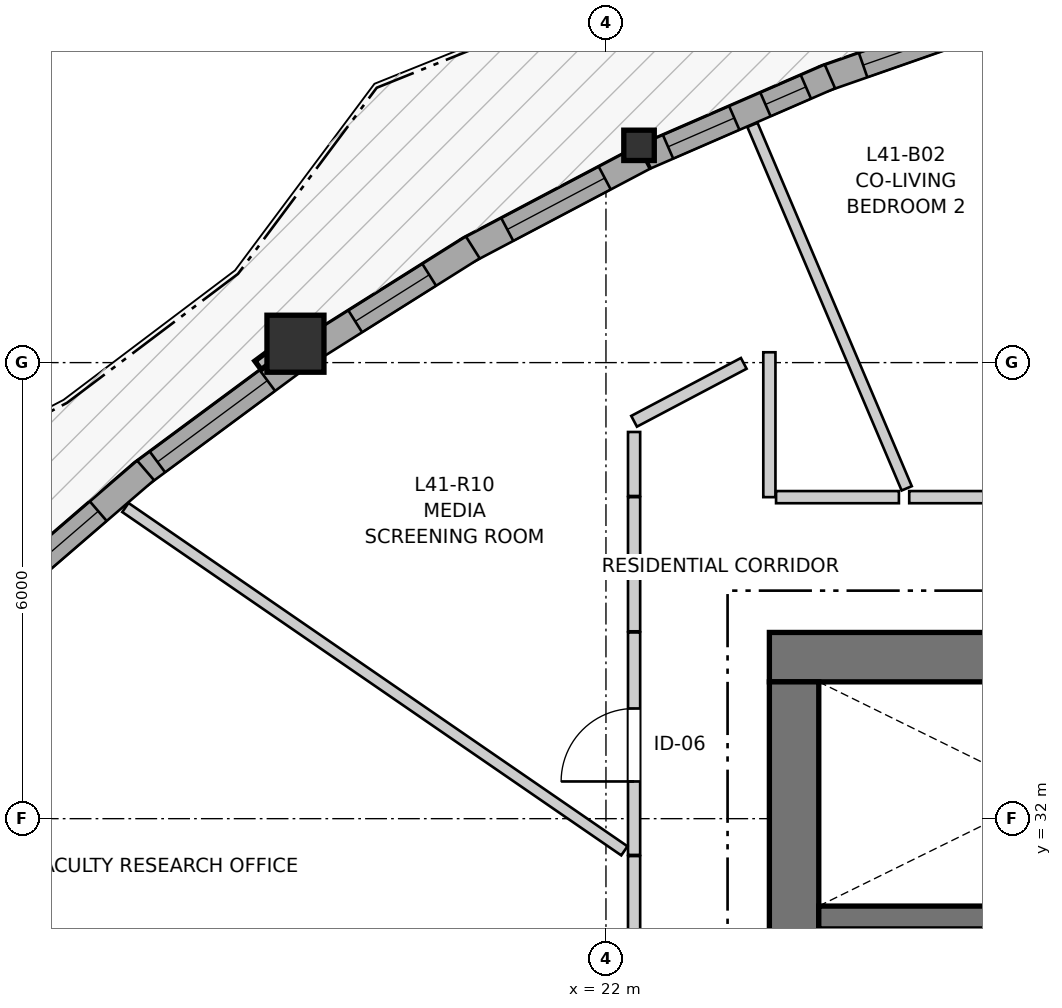
"""IFC4 building model, lengths in metres.
Left out: names, types, materials, properties, quantities, classifications, styles, units other than length and angle.
Written with IfcOpenShell. Run it as: python <this file> out.ifc"""

import sys

from ifc_helpers import new_model, si_unit, direction, frame, frame_2d, origin, origin_2d, place, context, subcontext, project, spatial, rectangle, i_section, extrude, source, transform, mapped, element, fill, save


model = new_model("IFC4")
c1 = context("Model", 3, precision=1e-05, world=origin(), true_north=direction((0.0, 1.0)))
c2 = subcontext(c1, "Body", "Model", "MODEL_VIEW")
j1 = project(units=[si_unit("LENGTHUNIT", "METRE"), si_unit("PLANEANGLEUNIT", "RADIAN")], contexts=[c1])
p1 = place(None, origin())
s1 = spatial("IfcSite", under=j1, at=p1, CompositionType="ELEMENT")
p2 = place(p1, origin())
s2 = spatial("IfcBuilding", under=s1, at=p2, CompositionType="ELEMENT")
p3 = place(p2, frame((0.0, 0.0, 139.4)))
s3 = spatial("IfcBuildingStorey", under=s2, at=p3, CompositionType="ELEMENT", Elevation=139.4)
p4 = place(p3, frame((36.55, 34.125, 0.0), z_axis=(0.0, 0.0, 1.0), x_axis=(-1.0, 0.0, 0.0)))
e1 = element("IfcWall", 1, at=p4, inside=s3, PredefinedType="SHEAR", context=c2, shape_type="SweptSolid", body=[
    extrude(rectangle(XDim=12.4, YDim=0.65, at=frame_2d((6.2, 0.0))), origin(), (0.0, 0.0, 1.0), 2.95),
])
p5 = place(p3, frame((24.475, 33.8, 0.0), z_axis=(0.0, 0.0, 1.0), x_axis=(0.0, -1.0, 0.0)))
e2 = element("IfcWall", 2, at=p5, inside=s3, PredefinedType="SHEAR", context=c2, shape_type="SweptSolid", body=[
    extrude(rectangle(XDim=15.6, YDim=0.65, at=frame_2d((7.8, 0.0))), origin(), (0.0, 0.0, 1.0), 2.95),
])
p6 = place(p5, frame((7.05, 0.0, 0.0)))
e3 = element("IfcOpeningElement", 3, at=p6, cuts=e2, PredefinedType="OPENING", context=c2, shape_type="SweptSolid", body=[
    extrude(rectangle(XDim=1.5, YDim=2.15, at=frame_2d((0.75, 1.075))), frame((0.0, 0.335, 0.0), z_axis=(0.0, -1.0, 0.0), x_axis=(1.0, 0.0, 0.0)), (0.0, 0.0, 1.0), 0.67),
])
p7 = place(p5, frame((3.52, 0.0, 0.0)))
e4 = element("IfcOpeningElement", 4, at=p7, cuts=e2, PredefinedType="OPENING", context=c2, shape_type="SweptSolid", body=[
    extrude(rectangle(XDim=0.86, YDim=2.05, at=frame_2d((0.43, 1.025))), frame((0.0, 0.335, 0.0), z_axis=(0.0, -1.0, 0.0), x_axis=(1.0, 0.0, 0.0)), (0.0, 0.0, 1.0), 0.67),
])
p8 = place(p5, frame((11.22, 0.0, 0.0)))
e5 = element("IfcOpeningElement", 5, at=p8, cuts=e2, PredefinedType="OPENING", context=c2, shape_type="SweptSolid", body=[
    extrude(rectangle(XDim=0.86, YDim=2.05, at=frame_2d((0.43, 1.025))), frame((0.0, 0.335, 0.0), z_axis=(0.0, -1.0, 0.0), x_axis=(1.0, 0.0, 0.0)), (0.0, 0.0, 1.0), 0.67),
])
p9 = place(p3, frame((24.8, 30.7, 0.0), z_axis=(0.0, 0.0, 1.0), x_axis=(1.0, 0.0, 0.0)))
e6 = element("IfcWall", 6, at=p9, inside=s3, PredefinedType="SHEAR", context=c2, shape_type="SweptSolid", body=[
    extrude(rectangle(XDim=11.1, YDim=0.3, at=frame_2d((5.55, 0.0))), origin(), (0.0, 0.0, 1.0), 2.95),
])
p10 = place(p9, frame((6.22, 0.0, 0.0)))
e7 = element("IfcOpeningElement", 7, at=p10, cuts=e6, PredefinedType="OPENING", context=c2, shape_type="SweptSolid", body=[
    extrude(rectangle(XDim=0.98, YDim=2.15, at=frame_2d((0.49, 1.075))), frame((0.0, 0.16, 0.0), z_axis=(0.0, -1.0, 0.0), x_axis=(1.0, 0.0, 0.0)), (0.0, 0.0, 1.0), 0.32),
])
p11 = place(p9, frame((9.15, 0.0, 0.0)))
e8 = element("IfcOpeningElement", 8, at=p11, cuts=e6, PredefinedType="OPENING", context=c2, shape_type="SweptSolid", body=[
    extrude(rectangle(XDim=1.15, YDim=2.15, at=frame_2d((0.575, 1.075))), frame((0.0, 0.16, 0.0), z_axis=(0.0, -1.0, 0.0), x_axis=(1.0, 0.0, 0.0)), (0.0, 0.0, 1.0), 0.32),
])
m1 = source(origin(), c2, "Body", "SweptSolid", [
    extrude(i_section(OverallWidth=0.401, OverallDepth=0.399, WebThickness=0.023, FlangeThickness=0.036, FilletRadius=0.015, at=origin_2d()), origin(), (0.0, 0.0, 1.0), 2.95),
])
p12 = place(p3, frame((22.435, 40.858, 0.0), z_axis=(0.0, 0.0, 1.0), x_axis=(1.0, 0.0, 0.0)))
e9 = element("IfcColumn", 9, at=p12, inside=s3, PredefinedType="PILASTER", context=c2, shape_type="MappedRepresentation", body=[
    mapped(m1, transform((0.0, 0.0, 0.0), x_axis=(1.0, 0.0, 0.0), y_axis=(0.0, 1.0, 0.0), z_axis=(0.0, 0.0, 1.0), scale=1.0)),
])
m2 = source(origin(), c2, "Body", "SweptSolid", [
    extrude(rectangle(XDim=0.75, YDim=0.75, at=origin_2d()), origin(), (0.0, 0.0, 1.0), 2.95),
])
p13 = place(p3, frame((17.915, 38.249, 0.0), z_axis=(0.0, 0.0, 1.0), x_axis=(1.0, 0.0, 0.0)))
e10 = element("IfcColumn", 10, at=p13, inside=s3, PredefinedType="COLUMN", context=c2, shape_type="MappedRepresentation", body=[
    mapped(m2, transform((0.0, 0.0, 0.0), x_axis=(1.0, 0.0, 0.0), y_axis=(0.0, 1.0, 0.0), z_axis=(0.0, 0.0, 1.0), scale=1.0)),
])
p14 = place(p3, frame((27.262, 42.57, 0.0), z_axis=(0.0, 0.0, 1.0), x_axis=(-0.944148723561, -0.329519631884, 0.0)))
e11 = element("IfcWall", 11, at=p14, inside=s3, PredefinedType="SOLIDWALL", context=c2, shape_type="SweptSolid", body=[
    extrude(rectangle(XDim=2.54, YDim=0.34, at=frame_2d((1.27, 0.0))), origin(), (0.0, 0.0, 1.0), 2.53),
])
p15 = place(p14, frame((0.54, 0.0, 0.82)))
e12 = element("IfcOpeningElement", 12, at=p15, cuts=e11, PredefinedType="OPENING", context=c2, shape_type="SweptSolid", body=[
    extrude(rectangle(XDim=1.45, YDim=1.25, at=frame_2d((0.725, 0.625))), frame((0.0, 0.18, 0.0), z_axis=(0.0, -1.0, 0.0), x_axis=(1.0, 0.0, 0.0)), (0.0, 0.0, 1.0), 0.36),
])
p16 = place(p3, frame((24.947, 41.765, 0.0), z_axis=(0.0, 0.0, 1.0), x_axis=(-0.917074459221, -0.398715984435, 0.0)))
e13 = element("IfcWall", 13, at=p16, inside=s3, PredefinedType="SOLIDWALL", context=c2, shape_type="SweptSolid", body=[
    extrude(rectangle(XDim=2.645, YDim=0.34, at=frame_2d((1.322, 0.0))), origin(), (0.0, 0.0, 1.0), 2.53),
])
p17 = place(p16, frame((0.344, 0.0, 0.82)))
e14 = element("IfcOpeningElement", 14, at=p17, cuts=e13, PredefinedType="OPENING", context=c2, shape_type="SweptSolid", body=[
    extrude(rectangle(XDim=0.58, YDim=1.35, at=frame_2d((0.29, 0.675))), frame((0.0, 0.18, 0.0), z_axis=(0.0, -1.0, 0.0), x_axis=(1.0, 0.0, 0.0)), (0.0, 0.0, 1.0), 0.36),
])
p18 = place(p16, frame((1.372, 0.0, 0.82)))
e15 = element("IfcOpeningElement", 15, at=p18, cuts=e13, PredefinedType="OPENING", context=c2, shape_type="SweptSolid", body=[
    extrude(rectangle(XDim=0.95, YDim=1.35, at=frame_2d((0.475, 0.675))), frame((0.0, 0.18, 0.0), z_axis=(0.0, -1.0, 0.0), x_axis=(1.0, 0.0, 0.0)), (0.0, 0.0, 1.0), 0.36),
])
p19 = place(p3, frame((22.497, 40.699, 0.0), z_axis=(0.0, 0.0, 1.0), x_axis=(-0.88439007496, -0.466748535415, 0.0)))
e16 = element("IfcWall", 16, at=p19, inside=s3, PredefinedType="SOLIDWALL", context=c2, shape_type="SweptSolid", body=[
    extrude(rectangle(XDim=2.63, YDim=0.34, at=frame_2d((1.315, 0.0))), origin(), (0.0, 0.0, 1.0), 2.53),
])
p20 = place(p19, frame((0.58, 0.0, 0.82)))
e17 = element("IfcOpeningElement", 17, at=p20, cuts=e16, PredefinedType="OPENING", context=c2, shape_type="SweptSolid", body=[
    extrude(rectangle(XDim=1.45, YDim=1.25, at=frame_2d((0.725, 0.625))), frame((0.0, 0.18, 0.0), z_axis=(0.0, -1.0, 0.0), x_axis=(1.0, 0.0, 0.0)), (0.0, 0.0, 1.0), 0.36),
])
p21 = place(p3, frame((20.248, 39.516, 0.0), z_axis=(0.0, 0.0, 1.0), x_axis=(-0.846438698205, -0.532486178394, 0.0)))
e18 = element("IfcWall", 18, at=p21, inside=s3, PredefinedType="SOLIDWALL", context=c2, shape_type="SweptSolid", body=[
    extrude(rectangle(XDim=2.495, YDim=0.34, at=frame_2d((1.247, 0.0))), origin(), (0.0, 0.0, 1.0), 2.53),
])
p22 = place(p21, frame((0.677, 0.0, 0.82)))
e19 = element("IfcOpeningElement", 19, at=p22, cuts=e18, PredefinedType="OPENING", context=c2, shape_type="SweptSolid", body=[
    extrude(rectangle(XDim=1.15, YDim=1.2, at=frame_2d((0.575, 0.6))), frame((0.0, 0.18, 0.0), z_axis=(0.0, -1.0, 0.0), x_axis=(1.0, 0.0, 0.0)), (0.0, 0.0, 1.0), 0.36),
])
p23 = place(p3, frame((17.891, 38.02, 0.0), z_axis=(0.0, 0.0, 1.0), x_axis=(-0.803824223013, -0.594866891411, 0.0)))
e20 = element("IfcWall", 20, at=p23, inside=s3, PredefinedType="SOLIDWALL", context=c2, shape_type="SweptSolid", body=[
    extrude(rectangle(XDim=2.51, YDim=0.34, at=frame_2d((1.255, 0.0))), origin(), (0.0, 0.0, 1.0), 2.53),
])
p24 = place(p23, frame((0.43, 0.0, 0.82)))
e21 = element("IfcOpeningElement", 21, at=p24, cuts=e20, PredefinedType="OPENING", context=c2, shape_type="SweptSolid", body=[
    extrude(rectangle(XDim=1.8, YDim=1.45, at=frame_2d((0.9, 0.725))), frame((0.0, 0.18, 0.0), z_axis=(0.0, -1.0, 0.0), x_axis=(1.0, 0.0, 0.0)), (0.0, 0.0, 1.0), 0.36),
])
p25 = place(p3, frame((15.943, 36.582, 0.0), z_axis=(0.0, 0.0, 1.0), x_axis=(-0.757520482063, -0.652811396389, 0.0)))
e22 = element("IfcWall", 22, at=p25, inside=s3, PredefinedType="SOLIDWALL", context=c2, shape_type="SweptSolid", body=[
    extrude(rectangle(XDim=2.674, YDim=0.34, at=frame_2d((1.337, 0.0))), origin(), (0.0, 0.0, 1.0), 2.53),
])
p26 = place(p25, frame((0.822, 0.0, 0.82)))
e23 = element("IfcOpeningElement", 23, at=p26, cuts=e22, PredefinedType="OPENING", context=c2, shape_type="SweptSolid", body=[
    extrude(rectangle(XDim=1.5, YDim=1.45, at=frame_2d((0.75, 0.725))), frame((0.0, 0.18, 0.0), z_axis=(0.0, -1.0, 0.0), x_axis=(1.0, 0.0, 0.0)), (0.0, 0.0, 1.0), 0.36),
])
p27 = place(p3, frame((25.99, 36.23, 0.0), z_axis=(0.0, 0.0, 1.0), x_axis=(1.0, 0.0, 0.0)))
e24 = element("IfcWall", 24, at=p27, inside=s3, PredefinedType="PARTITIONING", context=c2, shape_type="SweptSolid", body=[
    extrude(rectangle(XDim=4.073, YDim=0.16, at=frame_2d((2.037, 0.0))), origin(), (0.0, 0.0, 1.0), 2.95),
])
p28 = place(p27, frame((1.6, 0.0, 0.0)))
e25 = element("IfcOpeningElement", 25, at=p28, cuts=e24, PredefinedType="OPENING", context=c2, shape_type="SweptSolid", body=[
    extrude(rectangle(XDim=0.92, YDim=2.1, at=frame_2d((0.46, 1.05))), frame((0.0, 0.09, 0.0), z_axis=(0.0, -1.0, 0.0), x_axis=(1.0, 0.0, 0.0)), (0.0, 0.0, 1.0), 0.18),
])
p29 = place(p3, frame((22.37, 27.85, 0.0), z_axis=(0.0, 0.0, 1.0), x_axis=(0.0, 1.0, 0.0)))
e26 = element("IfcWall", 26, at=p29, inside=s3, PredefinedType="PARTITIONING", context=c2, shape_type="SweptSolid", body=[
    extrude(rectangle(XDim=3.658, YDim=0.16, at=frame_2d((1.829, 0.0))), origin(), (0.0, 0.0, 1.0), 2.95),
])
p30 = place(p29, frame((1.369, 0.0, 0.0)))
e27 = element("IfcOpeningElement", 27, at=p30, cuts=e26, PredefinedType="OPENING", context=c2, shape_type="SweptSolid", body=[
    extrude(rectangle(XDim=0.96, YDim=2.1, at=frame_2d((0.48, 1.05))), frame((0.0, 0.09, 0.0), z_axis=(0.0, -1.0, 0.0), x_axis=(1.0, 0.0, 0.0)), (0.0, 0.0, 1.0), 0.18),
])
p31 = place(p3, frame((22.37, 31.523, 0.0), z_axis=(0.0, 0.0, 1.0), x_axis=(0.0, 1.0, 0.0)))
e28 = element("IfcWall", 28, at=p31, inside=s3, PredefinedType="PARTITIONING", context=c2, shape_type="SweptSolid", body=[
    extrude(rectangle(XDim=2.927, YDim=0.16, at=frame_2d((1.463, 0.0))), origin(), (0.0, 0.0, 1.0), 2.95),
])
p32 = place(p31, frame((0.967, 0.0, 0.0)))
e29 = element("IfcOpeningElement", 29, at=p32, cuts=e28, PredefinedType="OPENING", context=c2, shape_type="SweptSolid", body=[
    extrude(rectangle(XDim=0.96, YDim=2.1, at=frame_2d((0.48, 1.05))), frame((0.0, 0.09, 0.0), z_axis=(0.0, -1.0, 0.0), x_axis=(1.0, 0.0, 0.0)), (0.0, 0.0, 1.0), 0.18),
])
p33 = place(p3, frame((15.677, 36.094, 0.0), z_axis=(0.0, 0.0, 1.0), x_axis=(0.823863992983, -0.566787544911, 0.0)))
e30 = element("IfcWall", 30, at=p33, inside=s3, PredefinedType="PARTITIONING", context=c2, shape_type="SweptSolid", body=[
    extrude(rectangle(XDim=7.969, YDim=0.145, at=frame_2d((3.984, 0.0))), origin(), (0.0, 0.0, 1.0), 2.95),
])
p34 = place(p3, frame((23.927, 41.127, 0.0), z_axis=(0.0, 0.0, 1.0), x_axis=(0.39073452171, -0.920503413108, 0.0)))
e31 = element("IfcWall", 31, at=p34, inside=s3, PredefinedType="PARTITIONING", context=c2, shape_type="SweptSolid", body=[
    extrude(rectangle(XDim=5.194, YDim=0.145, at=frame_2d((2.597, 0.0))), origin(), (0.0, 0.0, 1.0), 2.95),
])
p35 = place(p3, frame((24.15, 36.23, 0.0), z_axis=(0.0, 0.0, 1.0), x_axis=(0.0, 1.0, 0.0)))
e32 = element("IfcWall", 32, at=p35, inside=s3, PredefinedType="PARTITIONING", context=c2, shape_type="SweptSolid", body=[
    extrude(rectangle(XDim=1.906, YDim=0.16, at=frame_2d((0.953, 0.0))), origin(), (0.0, 0.0, 1.0), 2.95),
])
p36 = place(p3, frame((24.238, 36.23, 0.0), z_axis=(0.0, 0.0, 1.0), x_axis=(1.0, 0.0, 0.0)))
e33 = element("IfcWall", 33, at=p36, inside=s3, PredefinedType="PARTITIONING", context=c2, shape_type="SweptSolid", body=[
    extrude(rectangle(XDim=1.616, YDim=0.16, at=frame_2d((0.808, 0.0))), origin(), (0.0, 0.0, 1.0), 2.95),
])
p37 = place(p3, frame((22.37, 34.465, 0.0), z_axis=(0.0, 0.0, 1.0), x_axis=(0.0, 1.0, 0.0)))
e34 = element("IfcWall", 34, at=p37, inside=s3, PredefinedType="PARTITIONING", context=c2, shape_type="SweptSolid", body=[
    extrude(rectangle(XDim=1.765, YDim=0.16, at=frame_2d((0.882, 0.0))), origin(), (0.0, 0.0, 1.0), 2.95),
])
p38 = place(p3, frame((22.37, 37.228, 0.0), z_axis=(0.0, 0.0, 1.0), x_axis=(0.884271493782, 0.466973152638, 0.0)))
e35 = element("IfcWall", 35, at=p38, inside=s3, PredefinedType="PARTITIONING", context=c2, shape_type="SweptSolid", body=[
    extrude(rectangle(XDim=1.632, YDim=0.16, at=frame_2d((0.816, 0.0))), origin(), (0.0, 0.0, 1.0), 2.558),
])
p39 = place(p3, frame((22.37, 36.245, 0.0), z_axis=(0.0, 0.0, 1.0), x_axis=(0.0, 1.0, 0.0)))
e36 = element("IfcWall", 36, at=p39, inside=s3, PredefinedType="PARTITIONING", context=c2, shape_type="SweptSolid", body=[
    extrude(rectangle(XDim=0.842, YDim=0.16, at=frame_2d((0.421, 0.0))), origin(), (0.0, 0.0, 1.0), 2.95),
])
m3 = source(origin(), c2, "Body", "SweptSolid", [
    extrude(rectangle(XDim=1.45, YDim=1.25, at=frame_2d((0.725, 0.625))), frame((0.0, 0.03, 0.0), z_axis=(0.0, -1.0, 0.0), x_axis=(1.0, 0.0, 0.0)), (0.0, 0.0, 1.0), 0.06),
])
p40 = place(p15, origin())
e37 = element("IfcWindow", 37, at=p40, inside=s3, PartitioningType="SINGLE_PANEL", PredefinedType="WINDOW", context=c2, shape_type="MappedRepresentation", body=[
    mapped(m3, transform((0.0, 0.0, 0.0), x_axis=(1.0, 0.0, 0.0), y_axis=(0.0, 1.0, 0.0), z_axis=(0.0, 0.0, 1.0), scale=1.0)),
])
fill(e12, e37)
m4 = source(origin(), c2, "Body", "SweptSolid", [
    extrude(rectangle(XDim=0.58, YDim=1.35, at=frame_2d((0.29, 0.675))), frame((0.0, 0.03, 0.0), z_axis=(0.0, -1.0, 0.0), x_axis=(1.0, 0.0, 0.0)), (0.0, 0.0, 1.0), 0.06),
])
p41 = place(p17, origin())
e38 = element("IfcWindow", 38, at=p41, inside=s3, PartitioningType="SINGLE_PANEL", PredefinedType="WINDOW", context=c2, shape_type="MappedRepresentation", body=[
    mapped(m4, transform((0.0, 0.0, 0.0), x_axis=(1.0, 0.0, 0.0), y_axis=(0.0, 1.0, 0.0), z_axis=(0.0, 0.0, 1.0), scale=1.0)),
])
fill(e14, e38)
m5 = source(origin(), c2, "Body", "SweptSolid", [
    extrude(rectangle(XDim=0.95, YDim=1.35, at=frame_2d((0.475, 0.675))), frame((0.0, 0.03, 0.0), z_axis=(0.0, -1.0, 0.0), x_axis=(1.0, 0.0, 0.0)), (0.0, 0.0, 1.0), 0.06),
])
p42 = place(p18, origin())
e39 = element("IfcWindow", 39, at=p42, inside=s3, PartitioningType="SINGLE_PANEL", PredefinedType="WINDOW", context=c2, shape_type="MappedRepresentation", body=[
    mapped(m5, transform((0.0, 0.0, 0.0), x_axis=(1.0, 0.0, 0.0), y_axis=(0.0, 1.0, 0.0), z_axis=(0.0, 0.0, 1.0), scale=1.0)),
])
fill(e15, e39)
p43 = place(p20, origin())
e40 = element("IfcWindow", 40, at=p43, inside=s3, PartitioningType="SINGLE_PANEL", PredefinedType="WINDOW", context=c2, shape_type="MappedRepresentation", body=[
    mapped(m3, transform((0.0, 0.0, 0.0), x_axis=(1.0, 0.0, 0.0), y_axis=(0.0, 1.0, 0.0), z_axis=(0.0, 0.0, 1.0), scale=1.0)),
])
fill(e17, e40)
m6 = source(origin(), c2, "Body", "SweptSolid", [
    extrude(rectangle(XDim=1.15, YDim=1.2, at=frame_2d((0.575, 0.6))), frame((0.0, 0.03, 0.0), z_axis=(0.0, -1.0, 0.0), x_axis=(1.0, 0.0, 0.0)), (0.0, 0.0, 1.0), 0.06),
])
p44 = place(p22, origin())
e41 = element("IfcWindow", 41, at=p44, inside=s3, PartitioningType="SINGLE_PANEL", PredefinedType="WINDOW", context=c2, shape_type="MappedRepresentation", body=[
    mapped(m6, transform((0.0, 0.0, 0.0), x_axis=(1.0, 0.0, 0.0), y_axis=(0.0, 1.0, 0.0), z_axis=(0.0, 0.0, 1.0), scale=1.0)),
])
fill(e19, e41)
m7 = source(origin(), c2, "Body", "SweptSolid", [
    extrude(rectangle(XDim=1.8, YDim=1.45, at=frame_2d((0.9, 0.725))), frame((0.0, 0.03, 0.0), z_axis=(0.0, -1.0, 0.0), x_axis=(1.0, 0.0, 0.0)), (0.0, 0.0, 1.0), 0.06),
])
p45 = place(p24, origin())
e42 = element("IfcWindow", 42, at=p45, inside=s3, PartitioningType="SINGLE_PANEL", PredefinedType="WINDOW", context=c2, shape_type="MappedRepresentation", body=[
    mapped(m7, transform((0.0, 0.0, 0.0), x_axis=(1.0, 0.0, 0.0), y_axis=(0.0, 1.0, 0.0), z_axis=(0.0, 0.0, 1.0), scale=1.0)),
])
fill(e21, e42)
m8 = source(origin(), c2, "Body", "SweptSolid", [
    extrude(rectangle(XDim=1.5, YDim=1.45, at=frame_2d((0.75, 0.725))), frame((0.0, 0.03, 0.0), z_axis=(0.0, -1.0, 0.0), x_axis=(1.0, 0.0, 0.0)), (0.0, 0.0, 1.0), 0.06),
])
p46 = place(p26, origin())
e43 = element("IfcWindow", 43, at=p46, inside=s3, PartitioningType="SINGLE_PANEL", PredefinedType="WINDOW", context=c2, shape_type="MappedRepresentation", body=[
    mapped(m8, transform((0.0, 0.0, 0.0), x_axis=(1.0, 0.0, 0.0), y_axis=(0.0, 1.0, 0.0), z_axis=(0.0, 0.0, 1.0), scale=1.0)),
])
fill(e23, e43)
m9 = source(origin(), c2, "Body", "SweptSolid", [
    extrude(rectangle(XDim=0.96, YDim=2.1, at=frame_2d((0.48, 1.05))), frame((0.0, 0.025, 0.0), z_axis=(0.0, -1.0, 0.0), x_axis=(1.0, 0.0, 0.0)), (0.0, 0.0, 1.0), 0.05),
])
p47 = place(p32, origin())
e44 = element("IfcDoor", 44, at=p47, inside=s3, OperationType="SINGLE_SWING_LEFT", PredefinedType="DOOR", context=c2, shape_type="MappedRepresentation", body=[
    mapped(m9, transform((0.0, 0.0, 0.0), x_axis=(1.0, 0.0, 0.0), y_axis=(0.0, 1.0, 0.0), z_axis=(0.0, 0.0, 1.0), scale=1.0)),
])
fill(e29, e44)
save(model, sys.argv[1])
